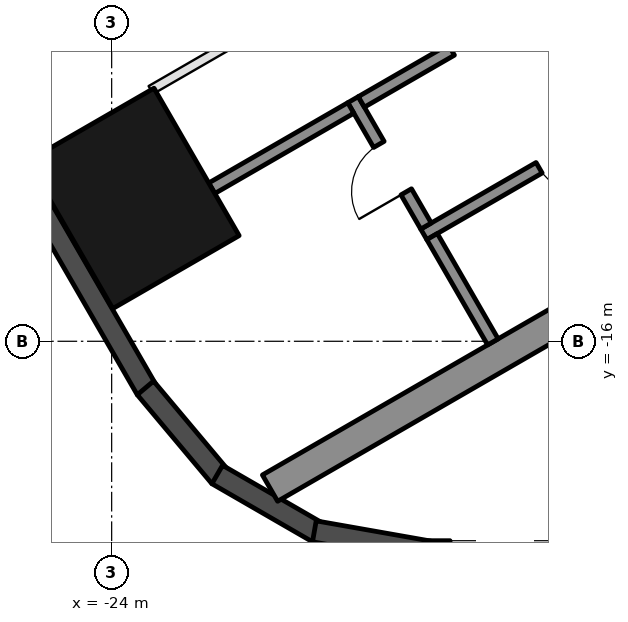
"""IFC4 building model, lengths in metres.
Left out: names, types, materials, properties, quantities, classifications, styles, units other than length and angle.
Written with IfcOpenShell. Run it as: python <this file> out.ifc"""

import sys

from ifc_helpers import new_model, si_unit, direction, frame, frame_2d, origin, origin_2d, place, context, subcontext, project, spatial, rectangle, hollow_rectangle, extrude, element, fill, save


model = new_model("IFC4")
c1 = context("Model", 3, precision=1e-05, world=origin(), true_north=direction((0.0, 1.0)))
c2 = subcontext(c1, "Body", "Model", "MODEL_VIEW")
j1 = project(units=[si_unit("LENGTHUNIT", "METRE"), si_unit("PLANEANGLEUNIT", "RADIAN")], contexts=[c1])
p1 = place(None, origin())
s1 = spatial("IfcSite", under=j1, at=p1, CompositionType="ELEMENT")
p2 = place(p1, origin())
s2 = spatial("IfcBuilding", under=s1, at=p2, CompositionType="ELEMENT")
p3 = place(p2, frame((0.0, 0.0, 120.5)))
s3 = spatial("IfcBuildingStorey", under=s2, at=p3, CompositionType="ELEMENT", Elevation=120.5)
p4 = place(p3, frame((-23.643, -13.65, 0.0), z_axis=(0.0, 0.0, 1.0), x_axis=(-0.5, 0.866025403784, 0.0)))
e1 = element("IfcColumn", 1, at=p4, inside=s3, PredefinedType="COLUMN", context=c2, shape_type="SweptSolid", body=[
    extrude(hollow_rectangle(XDim=2.8, YDim=2.4, WallThickness=0.07, at=origin_2d()), origin(), (0.0, 0.0, 1.0), 3.7),
])
p5 = place(p3, frame((-26.257, -11.893, 0.0), z_axis=(0.0, 0.0, 1.0), x_axis=(0.500018773155, -0.866014564827, 0.0)))
e2 = element("IfcWall", 2, at=p5, inside=s3, PredefinedType="SOLIDWALL", context=c2, shape_type="SweptSolid", body=[
    extrude(rectangle(XDim=5.658, YDim=0.35, at=frame_2d((2.829, 0.0))), origin(), (0.0, 0.0, 1.0), 3.55),
])
for number, where, z_axis, x_axis in (
    (3, (-23.445, -16.768, 0.0), (0.0, 0.0, 1.0), (0.643, -0.766, 0.0)),
    (4, (-22.264, -18.192, 0.0), (0.0, 0.0, 1.0), (0.866, -0.5, 0.0)),
):
    element("IfcWall", number, at=place(p3, frame(where, z_axis=z_axis, x_axis=x_axis)), inside=s3, PredefinedType="SOLIDWALL", context=c2, shape_type="SweptSolid", body=[
        extrude(rectangle(XDim=1.91, YDim=0.35, at=frame_2d((0.955, 0.0))), origin(), (0.0, 0.0, 1.0), 3.55),
    ])
p6 = place(p3, frame((-20.667, -19.126, 0.0), z_axis=(0.0, 0.0, 1.0), x_axis=(0.984798995425, -0.173697837091, 0.0)))
e5 = element("IfcWall", 5, at=p6, inside=s3, PredefinedType="SOLIDWALL", context=c2, shape_type="SweptSolid", body=[
    extrude(rectangle(XDim=1.91, YDim=0.35, at=frame_2d((0.955, 0.0))), origin(), (0.0, 0.0, 1.0), 3.55),
])
p7 = place(p3, frame((-18.816, -19.455, 0.0), z_axis=(0.0, 0.0, 1.0), x_axis=(1.0, 0.0, 0.0)))
e6 = element("IfcWall", 6, at=p7, inside=s3, PredefinedType="SOLIDWALL", context=c2, shape_type="SweptSolid", body=[
    extrude(rectangle(XDim=11.816, YDim=0.35, at=frame_2d((5.908, 0.0))), origin(), (0.0, 0.0, 1.0), 3.55),
])
p8 = place(p7, frame((0.381, 0.0, 0.3)))
e7 = element("IfcOpeningElement", 7, at=p8, cuts=e6, PredefinedType="OPENING", context=c2, shape_type="SweptSolid", body=[
    extrude(rectangle(XDim=1.8, YDim=2.65, at=frame_2d((0.9, 1.325))), frame((0.0, 0.185, 0.0), z_axis=(0.0, -1.0, 0.0), x_axis=(1.0, 0.0, 0.0)), (0.0, 0.0, 1.0), 0.37),
])
p9 = place(p7, frame((7.716, 0.0, 0.0)))
e8 = element("IfcOpeningElement", 8, at=p9, cuts=e6, PredefinedType="OPENING", context=c2, shape_type="SweptSolid", body=[
    extrude(rectangle(XDim=2.4, YDim=2.4, at=frame_2d((1.2, 1.2))), frame((0.0, 0.185, 0.0), z_axis=(0.0, -1.0, 0.0), x_axis=(1.0, 0.0, 0.0)), (0.0, 0.0, 1.0), 0.37),
])
p10 = place(p7, frame((3.816, 0.0, 0.3)))
e9 = element("IfcOpeningElement", 9, at=p10, cuts=e6, PredefinedType="OPENING", context=c2, shape_type="SweptSolid", body=[
    extrude(rectangle(XDim=1.6, YDim=2.65, at=frame_2d((0.8, 1.325))), frame((0.0, 0.185, 0.0), z_axis=(0.0, -1.0, 0.0), x_axis=(1.0, 0.0, 0.0)), (0.0, 0.0, 1.0), 0.37),
])
p11 = place(p7, frame((5.716, 0.0, 0.3)))
e10 = element("IfcOpeningElement", 10, at=p11, cuts=e6, PredefinedType="OPENING", context=c2, shape_type="SweptSolid", body=[
    extrude(rectangle(XDim=1.6, YDim=2.65, at=frame_2d((0.8, 1.325))), frame((0.0, 0.185, 0.0), z_axis=(0.0, -1.0, 0.0), x_axis=(1.0, 0.0, 0.0)), (0.0, 0.0, 1.0), 0.37),
])
p12 = place(p3, frame((-8.547, -10.997, 0.0), z_axis=(0.0, 0.0, 1.0), x_axis=(-0.866025009528, -0.500000682871, 0.0)))
e11 = element("IfcWall", 11, at=p12, inside=s3, PredefinedType="SHEAR", context=c2, shape_type="SweptSolid", body=[
    extrude(rectangle(XDim=14.837, YDim=0.5, at=frame_2d((7.418, 0.0))), origin(), (0.0, 0.0, 1.0), 3.5),
])
p13 = place(p3, frame((-10.068, -9.162, 0.0), z_axis=(0.0, 0.0, 1.0), x_axis=(-0.866032725843, -0.499987317609, 0.0)))
e12 = element("IfcWall", 12, at=p13, inside=s3, PredefinedType="SHEAR", context=c2, shape_type="SweptSolid", body=[
    extrude(rectangle(XDim=10.16, YDim=0.2, at=frame_2d((5.08, 0.0))), origin(), (0.0, 0.0, 1.0), 3.5),
])
p14 = place(p13, frame((1.99, 0.0, 0.0)))
e13 = element("IfcOpeningElement", 13, at=p14, cuts=e12, PredefinedType="OPENING", context=c2, shape_type="SweptSolid", body=[
    extrude(rectangle(XDim=0.9, YDim=2.1, at=frame_2d((0.45, 1.05))), frame((0.0, 0.11, 0.0), z_axis=(0.0, -1.0, 0.0), x_axis=(1.0, 0.0, 0.0)), (0.0, 0.0, 1.0), 0.22),
])
p15 = place(p13, frame((7.07, 0.0, 0.0)))
e14 = element("IfcOpeningElement", 14, at=p15, cuts=e12, PredefinedType="OPENING", context=c2, shape_type="SweptSolid", body=[
    extrude(rectangle(XDim=0.9, YDim=2.1, at=frame_2d((0.45, 1.05))), frame((0.0, 0.11, 0.0), z_axis=(0.0, -1.0, 0.0), x_axis=(1.0, 0.0, 0.0)), (0.0, 0.0, 1.0), 0.22),
])
p16 = place(p3, frame((-20.031, -12.026, 0.0), z_axis=(0.0, 0.0, 1.0), x_axis=(0.500033551112, -0.866006032174, 0.0)))
e15 = element("IfcWall", 15, at=p16, inside=s3, PredefinedType="SHEAR", context=c2, shape_type="SweptSolid", body=[
    extrude(rectangle(XDim=2.4, YDim=0.2, at=frame_2d((1.2, 0.0))), origin(), (0.0, 0.0, 1.0), 3.5),
])
p17 = place(p16, frame((0.85, 0.0, 0.0)))
e16 = element("IfcOpeningElement", 16, at=p17, cuts=e15, PredefinedType="OPENING", context=c2, shape_type="SweptSolid", body=[
    extrude(rectangle(XDim=0.9, YDim=2.1, at=frame_2d((0.45, 1.05))), frame((0.0, 0.11, 0.0), z_axis=(0.0, -1.0, 0.0), x_axis=(1.0, 0.0, 0.0)), (0.0, 0.0, 1.0), 0.22),
])
p18 = place(p3, frame((-18.413, -11.208, 0.0), z_axis=(0.0, 0.0, 1.0), x_axis=(-0.866038183914, -0.499977863513, 0.0)))
e17 = element("IfcWall", 17, at=p18, inside=s3, PredefinedType="SHEAR", context=c2, shape_type="SweptSolid", body=[
    extrude(rectangle(XDim=1.71, YDim=0.2, at=frame_2d((0.855, 0.0))), origin(), (0.0, 0.0, 1.0), 3.5),
])
p19 = place(p3, frame((-18.73, -14.278, 0.0), z_axis=(0.0, 0.0, 1.0), x_axis=(0.50002537861, -0.866010750942, 0.0)))
e18 = element("IfcWall", 18, at=p19, inside=s3, PredefinedType="SHEAR", context=c2, shape_type="SweptSolid", body=[
    extrude(rectangle(XDim=2.0, YDim=0.2, at=frame_2d((1.0, 0.0))), origin(), (0.0, 0.0, 1.0), 3.5),
])
p20 = place(p3, frame((-20.067, -12.163, 0.0), z_axis=(0.0, 0.0, 1.0), x_axis=(-0.866060851709, -0.499938597367, 0.0)))
e19 = element("IfcWall", 19, at=p20, inside=s3, PredefinedType="SHEAR", context=c2, shape_type="SweptSolid", body=[
    extrude(rectangle(XDim=2.64, YDim=0.2, at=frame_2d((1.32, 0.0))), origin(), (0.0, 0.0, 1.0), 3.5),
])
p21 = place(p3, frame((-19.363, -9.562, 0.0), z_axis=(0.0, 0.0, 1.0), x_axis=(-0.86601185002, -0.500023475074, 0.0)))
e20 = element("IfcWall", 20, at=p21, inside=s3, PredefinedType="PARTITIONING", context=c2, shape_type="SweptSolid", body=[
    extrude(rectangle(XDim=4.61, YDim=0.15, at=frame_2d((2.305, 0.0))), origin(), (0.0, 0.0, 1.0), 3.5),
])
p22 = place(p15, origin())
e21 = element("IfcDoor", 21, at=p22, inside=s3, OperationType="SINGLE_SWING_LEFT", PredefinedType="DOOR", context=c2, shape_type="SweptSolid", body=[
    extrude(rectangle(XDim=0.9, YDim=2.1, at=frame_2d((0.45, 1.05))), frame((0.0, 0.025, 0.0), z_axis=(0.0, -1.0, 0.0), x_axis=(1.0, 0.0, 0.0)), (0.0, 0.0, 1.0), 0.05),
])
fill(e14, e21)
p23 = place(p17, frame((0.9, 0.0, 0.0), z_axis=(0.0, 0.0, 1.0), x_axis=(-1.0, 0.0, 0.0)))
e22 = element("IfcDoor", 22, at=p23, inside=s3, OperationType="SINGLE_SWING_LEFT", PredefinedType="DOOR", context=c2, shape_type="SweptSolid", body=[
    extrude(rectangle(XDim=0.9, YDim=2.1, at=frame_2d((0.45, 1.05))), frame((0.0, 0.025, 0.0), z_axis=(0.0, -1.0, 0.0), x_axis=(1.0, 0.0, 0.0)), (0.0, 0.0, 1.0), 0.05),
])
fill(e16, e22)
save(model, sys.argv[1])
